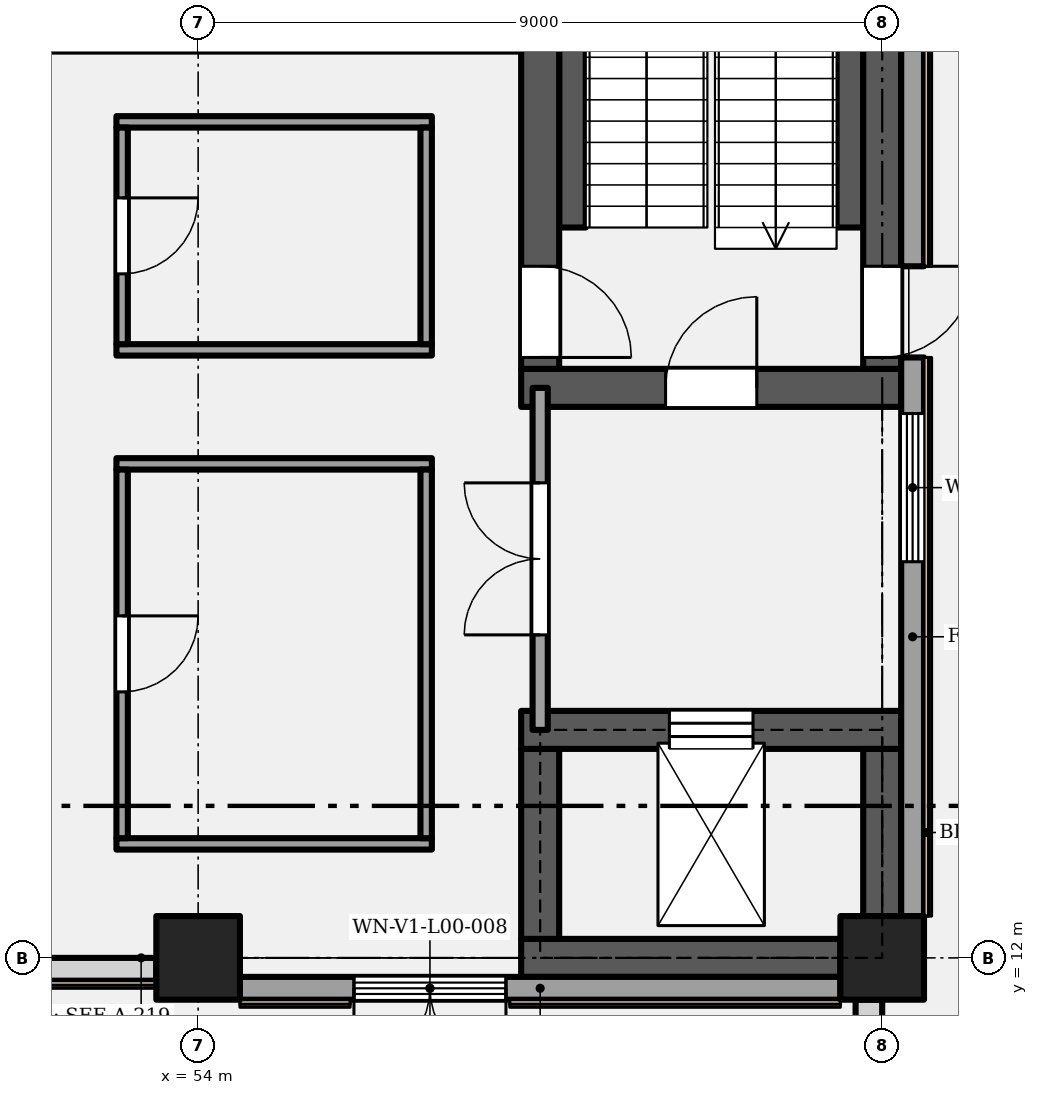
"""IFC4 building model, lengths in metres.
Left out: names, types, materials, properties, quantities, classifications, styles, units other than length and angle.
Written with IfcOpenShell. Run it as: python <this file> out.ifc"""

import sys

from ifc_helpers import new_model, si_unit, direction, frame, frame_2d, origin, origin_2d, place, context, subcontext, project, spatial, rectangle, extrude, element, fill, save


model = new_model("IFC4")
c1 = context("Model", 3, precision=1e-05, world=origin(), true_north=direction((0.0, 1.0)))
c2 = subcontext(c1, "Body", "Model", "MODEL_VIEW")
j1 = project(units=[si_unit("LENGTHUNIT", "METRE"), si_unit("PLANEANGLEUNIT", "RADIAN")], contexts=[c1])
p1 = place(None, origin())
s1 = spatial("IfcSite", under=j1, at=p1, CompositionType="ELEMENT")
p2 = place(p1, origin())
s2 = spatial("IfcBuilding", under=s1, at=p2, CompositionType="ELEMENT")
p3 = place(p2, origin())
s3 = spatial("IfcBuildingStorey", under=s2, at=p3, CompositionType="ELEMENT", Elevation=0.0)
for number, where, z_axis, x_axis in (
    (1, (54.0, 12.0, 0.0), (0.0, 0.0, 1.0), (1.0, 0.0, 0.0)),
    (2, (63.0, 12.0, 0.0), (0.0, 0.0, 1.0), (1.0, 0.0, 0.0)),
):
    element("IfcColumn", number, at=place(p3, frame(where, z_axis=z_axis, x_axis=x_axis)), inside=s3, PredefinedType="COLUMN", context=c2, shape_type="SweptSolid", body=[
        extrude(rectangle(XDim=1.1, YDim=1.1, at=origin_2d()), origin(), (0.0, 0.0, 1.0), 6.6),
    ])
p4 = place(p3, frame((58.25, 12.0, 0.0), z_axis=(0.0, 0.0, 1.0), x_axis=(1.0, 0.0, 0.0)))
e3 = element("IfcWall", 3, at=p4, inside=s3, PredefinedType="SHEAR", context=c2, shape_type="SweptSolid", body=[
    extrude(rectangle(XDim=4.2, YDim=0.5, at=frame_2d((2.1, 0.0))), origin(), (0.0, 0.0, 1.0), 6.3),
])
p5 = place(p3, frame((58.5, 12.25, 0.0), z_axis=(0.0, 0.0, 1.0), x_axis=(0.0, 1.0, 0.0)))
e4 = element("IfcWall", 4, at=p5, inside=s3, PredefinedType="SHEAR", context=c2, shape_type="SweptSolid", body=[
    extrude(rectangle(XDim=2.5, YDim=0.5, at=frame_2d((1.25, 0.0))), origin(), (0.0, 0.0, 1.0), 6.3),
])
p6 = place(p3, frame((63.0, 12.55, 0.0), z_axis=(0.0, 0.0, 1.0), x_axis=(0.0, 1.0, 0.0)))
e5 = element("IfcWall", 5, at=p6, inside=s3, PredefinedType="SHEAR", context=c2, shape_type="SweptSolid", body=[
    extrude(rectangle(XDim=2.2, YDim=0.5, at=frame_2d((1.1, 0.0))), origin(), (0.0, 0.0, 1.0), 6.3),
])
p7 = place(p3, frame((58.25, 15.0, 0.0), z_axis=(0.0, 0.0, 1.0), x_axis=(1.0, 0.0, 0.0)))
e6 = element("IfcWall", 6, at=p7, inside=s3, PredefinedType="SHEAR", context=c2, shape_type="SweptSolid", body=[
    extrude(rectangle(XDim=5.0, YDim=0.5, at=frame_2d((2.5, 0.0))), origin(), (0.0, 0.0, 1.0), 6.3),
])
p8 = place(p7, frame((1.95, 0.0, 0.0)))
e7 = element("IfcOpeningElement", 7, at=p8, cuts=e6, PredefinedType="OPENING", context=c2, shape_type="SweptSolid", body=[
    extrude(rectangle(XDim=1.1, YDim=2.1, at=frame_2d((0.55, 1.05))), frame((0.0, 0.26, 0.0), z_axis=(0.0, -1.0, 0.0), x_axis=(1.0, 0.0, 0.0)), (0.0, 0.0, 1.0), 0.52),
])
p9 = place(p3, frame((58.25, 19.5, 0.0), z_axis=(0.0, 0.0, 1.0), x_axis=(1.0, 0.0, 0.0)))
e8 = element("IfcWall", 8, at=p9, inside=s3, PredefinedType="SHEAR", context=c2, shape_type="SweptSolid", body=[
    extrude(rectangle(XDim=5.0, YDim=0.5, at=frame_2d((2.5, 0.0))), origin(), (0.0, 0.0, 1.0), 6.3),
])
p10 = place(p9, frame((1.9, 0.0, 0.0)))
e9 = element("IfcOpeningElement", 9, at=p10, cuts=e8, PredefinedType="OPENING", context=c2, shape_type="SweptSolid", body=[
    extrude(rectangle(XDim=1.2, YDim=2.1, at=frame_2d((0.6, 1.05))), frame((0.0, 0.26, 0.0), z_axis=(0.0, -1.0, 0.0), x_axis=(1.0, 0.0, 0.0)), (0.0, 0.0, 1.0), 0.52),
])
p11 = place(p3, frame((58.5, 19.75, 0.0), z_axis=(0.0, 0.0, 1.0), x_axis=(0.0, 1.0, 0.0)))
e10 = element("IfcWall", 10, at=p11, inside=s3, PredefinedType="SHEAR", context=c2, shape_type="SweptSolid", body=[
    extrude(rectangle(XDim=8.5, YDim=0.5, at=frame_2d((4.25, 0.0))), origin(), (0.0, 0.0, 1.0), 6.3),
])
p12 = place(p11, frame((1.35, 0.0, 0.0), z_axis=(0.0, 0.0, 1.0), x_axis=(-1.0, 0.0, 0.0)))
e11 = element("IfcOpeningElement", 11, at=p12, cuts=e10, PredefinedType="OPENING", context=c2, shape_type="SweptSolid", body=[
    extrude(rectangle(XDim=1.2, YDim=2.1, at=frame_2d((0.6, 1.05))), frame((0.0, 0.26, 0.0), z_axis=(0.0, -1.0, 0.0), x_axis=(1.0, 0.0, 0.0)), (0.0, 0.0, 1.0), 0.52),
])
p13 = place(p3, frame((63.0, 19.75, 0.0), z_axis=(0.0, 0.0, 1.0), x_axis=(0.0, 1.0, 0.0)))
e12 = element("IfcWall", 12, at=p13, inside=s3, PredefinedType="SHEAR", context=c2, shape_type="SweptSolid", body=[
    extrude(rectangle(XDim=8.2, YDim=0.5, at=frame_2d((4.1, 0.0))), origin(), (0.0, 0.0, 1.0), 6.3),
])
p14 = place(p13, frame((1.35, 0.0, 0.0), z_axis=(0.0, 0.0, 1.0), x_axis=(-1.0, 0.0, 0.0)))
e13 = element("IfcOpeningElement", 13, at=p14, cuts=e12, PredefinedType="OPENING", context=c2, shape_type="SweptSolid", body=[
    extrude(rectangle(XDim=1.2, YDim=2.1, at=frame_2d((0.6, 1.05))), frame((0.0, 0.26, 0.0), z_axis=(0.0, -1.0, 0.0), x_axis=(1.0, 0.0, 0.0)), (0.0, 0.0, 1.0), 0.52),
])
p15 = place(p3, frame((63.4, 12.55, 0.0), z_axis=(0.0, 0.0, 1.0), x_axis=(0.0, 1.0, 0.0)))
e14 = element("IfcWall", 14, at=p15, inside=s3, PredefinedType="SOLIDWALL", context=c2, shape_type="SweptSolid", body=[
    extrude(rectangle(XDim=7.35, YDim=0.3, at=frame_2d((3.675, 0.0))), origin(), (0.0, 0.0, 1.0), 6.3),
])
p16 = place(p15, frame((4.663, 0.0, 0.9)))
e15 = element("IfcOpeningElement", 15, at=p16, cuts=e14, PredefinedType="OPENING", context=c2, shape_type="SweptSolid", body=[
    extrude(rectangle(XDim=1.95, YDim=3.0, at=frame_2d((0.975, 1.5))), frame((0.0, 0.16, 0.0), z_axis=(0.0, -1.0, 0.0), x_axis=(1.0, 0.0, 0.0)), (0.0, 0.0, 1.0), 0.32),
])
p17 = place(p3, frame((63.4, 21.1, 0.0), z_axis=(0.0, 0.0, 1.0), x_axis=(0.0, 1.0, 0.0)))
e16 = element("IfcWall", 16, at=p17, inside=s3, PredefinedType="SOLIDWALL", context=c2, shape_type="SweptSolid", body=[
    extrude(rectangle(XDim=6.85, YDim=0.3, at=frame_2d((3.425, 0.0))), origin(), (0.0, 0.0, 1.0), 6.3),
])
p18 = place(p3, frame((45.55, 11.85, 0.0), z_axis=(0.0, 0.0, 1.0), x_axis=(1.0, 0.0, 0.0)))
e17 = element("IfcWall", 17, at=p18, inside=s3, PredefinedType="SOLIDWALL", context=c2, shape_type="SweptSolid", body=[
    extrude(rectangle(XDim=7.9, YDim=0.3, at=frame_2d((3.95, 0.0))), origin(), (0.0, 0.0, 1.0), 6.6),
])
p19 = place(p18, frame((4.95, 0.0, 0.0), z_axis=(0.0, 0.0, 1.0), x_axis=(-1.0, 0.0, 0.0)))
e18 = element("IfcOpeningElement", 18, at=p19, cuts=e17, PredefinedType="OPENING", context=c2, shape_type="SweptSolid", body=[
    extrude(rectangle(XDim=2.0, YDim=2.1, at=frame_2d((1.0, 1.05))), frame((0.0, 0.16, 0.0), z_axis=(0.0, -1.0, 0.0), x_axis=(1.0, 0.0, 0.0)), (0.0, 0.0, 1.0), 0.32),
])
p20 = place(p18, frame((2.95, 0.0, 2.25)))
e19 = element("IfcOpeningElement", 19, at=p20, cuts=e17, PredefinedType="OPENING", context=c2, shape_type="SweptSolid", body=[
    extrude(rectangle(XDim=2.0, YDim=0.8, at=frame_2d((1.0, 0.4))), frame((0.0, 0.16, 0.0), z_axis=(0.0, -1.0, 0.0), x_axis=(1.0, 0.0, 0.0)), (0.0, 0.0, 1.0), 0.32),
])
p21 = place(p3, frame((54.55, 11.6, 0.0), z_axis=(0.0, 0.0, 1.0), x_axis=(1.0, 0.0, 0.0)))
e20 = element("IfcWall", 20, at=p21, inside=s3, PredefinedType="SOLIDWALL", context=c2, shape_type="SweptSolid", body=[
    extrude(rectangle(XDim=7.9, YDim=0.3, at=frame_2d((3.95, 0.0))), origin(), (0.0, 0.0, 1.0), 6.6),
])
p22 = place(p21, frame((3.5, 0.0, 0.0), z_axis=(0.0, 0.0, 1.0), x_axis=(-1.0, 0.0, 0.0)))
e21 = element("IfcOpeningElement", 21, at=p22, cuts=e20, PredefinedType="OPENING", context=c2, shape_type="SweptSolid", body=[
    extrude(rectangle(XDim=2.0, YDim=2.1, at=frame_2d((1.0, 1.05))), frame((0.0, 0.16, 0.0), z_axis=(0.0, -1.0, 0.0), x_axis=(1.0, 0.0, 0.0)), (0.0, 0.0, 1.0), 0.32),
])
p23 = place(p21, frame((1.5, 0.0, 2.25)))
e22 = element("IfcOpeningElement", 22, at=p23, cuts=e20, PredefinedType="OPENING", context=c2, shape_type="SweptSolid", body=[
    extrude(rectangle(XDim=2.0, YDim=0.8, at=frame_2d((1.0, 0.4))), frame((0.0, 0.16, 0.0), z_axis=(0.0, -1.0, 0.0), x_axis=(1.0, 0.0, 0.0)), (0.0, 0.0, 1.0), 0.32),
])
p24 = place(p3, frame((62.825, 0.7, 0.0), z_axis=(0.0, 0.0, 1.0), x_axis=(0.0, 1.0, 0.0)))
e23 = element("IfcWall", 23, at=p24, inside=s3, PredefinedType="SOLIDWALL", context=c2, shape_type="SweptSolid", body=[
    extrude(rectangle(XDim=10.75, YDim=0.35, at=frame_2d((5.375, 0.0))), origin(), (0.0, 0.0, 1.0), 6.6),
])
for number, where, z_axis, x_axis in (
    (24, (52.925, 13.5, 0.0), (0.0, 0.0, 1.0), (1.0, 0.0, 0.0)),
    (25, (52.925, 18.5, 0.0), (0.0, 0.0, 1.0), (1.0, 0.0, 0.0)),
):
    element("IfcWall", number, at=place(p3, frame(where, z_axis=z_axis, x_axis=x_axis)), inside=s3, PredefinedType="PARTITIONING", context=c2, shape_type="SweptSolid", body=[
        extrude(rectangle(XDim=4.15, YDim=0.15, at=frame_2d((2.075, 0.0))), origin(), (0.0, 0.0, 1.0), 6.3),
    ])
p25 = place(p3, frame((52.925, 20.0, 0.0), z_axis=(0.0, 0.0, 1.0), x_axis=(1.0, 0.0, 0.0)))
e26 = element("IfcWall", 26, at=p25, inside=s3, PredefinedType="PARTITIONING", context=c2, shape_type="SweptSolid", body=[
    extrude(rectangle(XDim=4.15, YDim=0.15, at=frame_2d((2.075, 0.0))), origin(), (0.0, 0.0, 1.0), 5.05),
])
p26 = place(p3, frame((52.925, 23.0, 0.0), z_axis=(0.0, 0.0, 1.0), x_axis=(1.0, 0.0, 0.0)))
e27 = element("IfcWall", 27, at=p26, inside=s3, PredefinedType="PARTITIONING", context=c2, shape_type="SweptSolid", body=[
    extrude(rectangle(XDim=4.15, YDim=0.15, at=frame_2d((2.075, 0.0))), origin(), (0.0, 0.0, 1.0), 6.3),
])
p27 = place(p3, frame((53.0, 13.575, 0.0), z_axis=(0.0, 0.0, 1.0), x_axis=(0.0, 1.0, 0.0)))
e28 = element("IfcWall", 28, at=p27, inside=s3, PredefinedType="PARTITIONING", context=c2, shape_type="SweptSolid", body=[
    extrude(rectangle(XDim=4.85, YDim=0.15, at=frame_2d((2.425, 0.0))), origin(), (0.0, 0.0, 1.0), 6.3),
])
p28 = place(p27, frame((2.925, 0.0, 0.0), z_axis=(0.0, 0.0, 1.0), x_axis=(-1.0, 0.0, 0.0)))
e29 = element("IfcOpeningElement", 29, at=p28, cuts=e28, PredefinedType="OPENING", context=c2, shape_type="SweptSolid", body=[
    extrude(rectangle(XDim=1.0, YDim=2.4, at=frame_2d((0.5, 1.2))), frame((0.0, 0.085, 0.0), z_axis=(0.0, -1.0, 0.0), x_axis=(1.0, 0.0, 0.0)), (0.0, 0.0, 1.0), 0.17),
])
p29 = place(p3, frame((53.0, 20.075, 0.0), z_axis=(0.0, 0.0, 1.0), x_axis=(0.0, 1.0, 0.0)))
e30 = element("IfcWall", 30, at=p29, inside=s3, PredefinedType="PARTITIONING", context=c2, shape_type="SweptSolid", body=[
    extrude(rectangle(XDim=2.85, YDim=0.15, at=frame_2d((1.425, 0.0))), origin(), (0.0, 0.0, 1.0), 6.3),
])
p30 = place(p29, frame((1.925, 0.0, 0.0), z_axis=(0.0, 0.0, 1.0), x_axis=(-1.0, 0.0, 0.0)))
e31 = element("IfcOpeningElement", 31, at=p30, cuts=e30, PredefinedType="OPENING", context=c2, shape_type="SweptSolid", body=[
    extrude(rectangle(XDim=1.0, YDim=2.4, at=frame_2d((0.5, 1.2))), frame((0.0, 0.085, 0.0), z_axis=(0.0, -1.0, 0.0), x_axis=(1.0, 0.0, 0.0)), (0.0, 0.0, 1.0), 0.17),
])
p31 = place(p3, frame((57.0, 13.575, 0.0), z_axis=(0.0, 0.0, 1.0), x_axis=(0.0, 1.0, 0.0)))
e32 = element("IfcWall", 32, at=p31, inside=s3, PredefinedType="PARTITIONING", context=c2, shape_type="SweptSolid", body=[
    extrude(rectangle(XDim=4.85, YDim=0.15, at=frame_2d((2.425, 0.0))), origin(), (0.0, 0.0, 1.0), 6.3),
])
p32 = place(p3, frame((57.0, 20.075, 0.0), z_axis=(0.0, 0.0, 1.0), x_axis=(0.0, 1.0, 0.0)))
e33 = element("IfcWall", 33, at=p32, inside=s3, PredefinedType="PARTITIONING", context=c2, shape_type="SweptSolid", body=[
    extrude(rectangle(XDim=2.85, YDim=0.15, at=frame_2d((1.425, 0.0))), origin(), (0.0, 0.0, 1.0), 6.3),
])
p33 = place(p3, frame((58.5, 15.0, 0.0), z_axis=(0.0, 0.0, 1.0), x_axis=(0.0, 1.0, 0.0)))
e34 = element("IfcWall", 34, at=p33, inside=s3, PredefinedType="PARTITIONING", context=c2, shape_type="SweptSolid", body=[
    extrude(rectangle(XDim=4.5, YDim=0.2, at=frame_2d((2.25, 0.0))), origin(), (0.0, 0.0, 1.0), 5.2),
])
p34 = place(p33, frame((1.25, 0.0, 0.0)))
e35 = element("IfcOpeningElement", 35, at=p34, cuts=e34, PredefinedType="OPENING", context=c2, shape_type="SweptSolid", body=[
    extrude(rectangle(XDim=2.0, YDim=2.7, at=frame_2d((1.0, 1.35))), frame((0.0, 0.11, 0.0), z_axis=(0.0, -1.0, 0.0), x_axis=(1.0, 0.0, 0.0)), (0.0, 0.0, 1.0), 0.22),
])
p35 = place(p3, frame((58.925, 21.61, 0.0), z_axis=(0.0, 0.0, 1.0), x_axis=(0.0, 1.0, 0.0)))
e36 = element("IfcWall", 36, at=p35, inside=s3, PredefinedType="SHEAR", context=c2, shape_type="SweptSolid", body=[
    extrude(rectangle(XDim=6.64, YDim=0.35, at=frame_2d((3.32, 0.0))), origin(), (0.0, 0.0, 1.0), 3.1),
])
p36 = place(p3, frame((62.575, 21.61, 0.0), z_axis=(0.0, 0.0, 1.0), x_axis=(0.0, 1.0, 0.0)))
e37 = element("IfcWall", 37, at=p36, inside=s3, PredefinedType="SHEAR", context=c2, shape_type="SweptSolid", body=[
    extrude(rectangle(XDim=6.64, YDim=0.35, at=frame_2d((3.32, 0.0))), origin(), (0.0, 0.0, 1.0), 6.3),
])
p37 = place(p16, origin())
e38 = element("IfcWindow", 38, at=p37, inside=s3, PartitioningType="SINGLE_PANEL", PredefinedType="WINDOW", context=c2, shape_type="SweptSolid", body=[
    extrude(rectangle(XDim=1.95, YDim=3.0, at=frame_2d((0.975, 1.5))), frame((0.0, 0.03, 0.0), z_axis=(0.0, -1.0, 0.0), x_axis=(1.0, 0.0, 0.0)), (0.0, 0.0, 1.0), 0.06),
])
fill(e15, e38)
p38 = place(p14, origin())
e39 = element("IfcDoor", 39, at=p38, inside=s3, OperationType="SINGLE_SWING_RIGHT", PredefinedType="DOOR", context=c2, shape_type="SweptSolid", body=[
    extrude(rectangle(XDim=1.2, YDim=2.1, at=frame_2d((0.6, 1.05))), frame((0.0, 0.025, 0.0), z_axis=(0.0, -1.0, 0.0), x_axis=(1.0, 0.0, 0.0)), (0.0, 0.0, 1.0), 0.05),
])
fill(e13, e39)
p39 = place(p22, origin())
e40 = element("IfcDoor", 40, at=p39, inside=s3, OperationType="DOUBLE_DOOR_SINGLE_SWING", PredefinedType="DOOR", context=c2, shape_type="SweptSolid", body=[
    extrude(rectangle(XDim=2.0, YDim=2.1, at=frame_2d((1.0, 1.05))), frame((0.0, 0.025, 0.0), z_axis=(0.0, -1.0, 0.0), x_axis=(1.0, 0.0, 0.0)), (0.0, 0.0, 1.0), 0.05),
])
fill(e21, e40)
p40 = place(p23, origin())
e41 = element("IfcWindow", 41, at=p40, inside=s3, PartitioningType="SINGLE_PANEL", PredefinedType="WINDOW", context=c2, shape_type="SweptSolid", body=[
    extrude(rectangle(XDim=2.0, YDim=0.8, at=frame_2d((1.0, 0.4))), frame((0.0, 0.03, 0.0), z_axis=(0.0, -1.0, 0.0), x_axis=(1.0, 0.0, 0.0)), (0.0, 0.0, 1.0), 0.06),
])
fill(e22, e41)
p41 = place(p12, origin())
e42 = element("IfcDoor", 42, at=p41, inside=s3, OperationType="SINGLE_SWING_RIGHT", PredefinedType="DOOR", context=c2, shape_type="SweptSolid", body=[
    extrude(rectangle(XDim=1.2, YDim=2.1, at=frame_2d((0.6, 1.05))), frame((0.0, 0.025, 0.0), z_axis=(0.0, -1.0, 0.0), x_axis=(1.0, 0.0, 0.0)), (0.0, 0.0, 1.0), 0.05),
])
fill(e11, e42)
p42 = place(p8, origin())
e43 = element("IfcDoor", 43, at=p42, inside=s3, OperationType="SLIDING_TO_LEFT", PredefinedType="DOOR", context=c2, shape_type="SweptSolid", body=[
    extrude(rectangle(XDim=1.1, YDim=2.1, at=frame_2d((0.55, 1.05))), frame((0.0, 0.025, 0.0), z_axis=(0.0, -1.0, 0.0), x_axis=(1.0, 0.0, 0.0)), (0.0, 0.0, 1.0), 0.05),
])
fill(e7, e43)
p43 = place(p34, origin())
e44 = element("IfcDoor", 44, at=p43, inside=s3, OperationType="DOUBLE_DOOR_SINGLE_SWING", PredefinedType="DOOR", context=c2, shape_type="SweptSolid", body=[
    extrude(rectangle(XDim=2.0, YDim=2.7, at=frame_2d((1.0, 1.35))), frame((0.0, 0.025, 0.0), z_axis=(0.0, -1.0, 0.0), x_axis=(1.0, 0.0, 0.0)), (0.0, 0.0, 1.0), 0.05),
])
fill(e35, e44)
p44 = place(p10, origin())
e45 = element("IfcDoor", 45, at=p44, inside=s3, OperationType="SINGLE_SWING_RIGHT", PredefinedType="DOOR", context=c2, shape_type="SweptSolid", body=[
    extrude(rectangle(XDim=1.2, YDim=2.1, at=frame_2d((0.6, 1.05))), frame((0.0, 0.025, 0.0), z_axis=(0.0, -1.0, 0.0), x_axis=(1.0, 0.0, 0.0)), (0.0, 0.0, 1.0), 0.05),
])
fill(e9, e45)
p45 = place(p28, origin())
e46 = element("IfcDoor", 46, at=p45, inside=s3, OperationType="SINGLE_SWING_LEFT", PredefinedType="DOOR", context=c2, shape_type="SweptSolid", body=[
    extrude(rectangle(XDim=1.0, YDim=2.4, at=frame_2d((0.5, 1.2))), frame((0.0, 0.025, 0.0), z_axis=(0.0, -1.0, 0.0), x_axis=(1.0, 0.0, 0.0)), (0.0, 0.0, 1.0), 0.05),
])
fill(e29, e46)
p46 = place(p30, origin())
e47 = element("IfcDoor", 47, at=p46, inside=s3, OperationType="SINGLE_SWING_LEFT", PredefinedType="DOOR", context=c2, shape_type="SweptSolid", body=[
    extrude(rectangle(XDim=1.0, YDim=2.4, at=frame_2d((0.5, 1.2))), frame((0.0, 0.025, 0.0), z_axis=(0.0, -1.0, 0.0), x_axis=(1.0, 0.0, 0.0)), (0.0, 0.0, 1.0), 0.05),
])
fill(e31, e47)
save(model, sys.argv[1])
